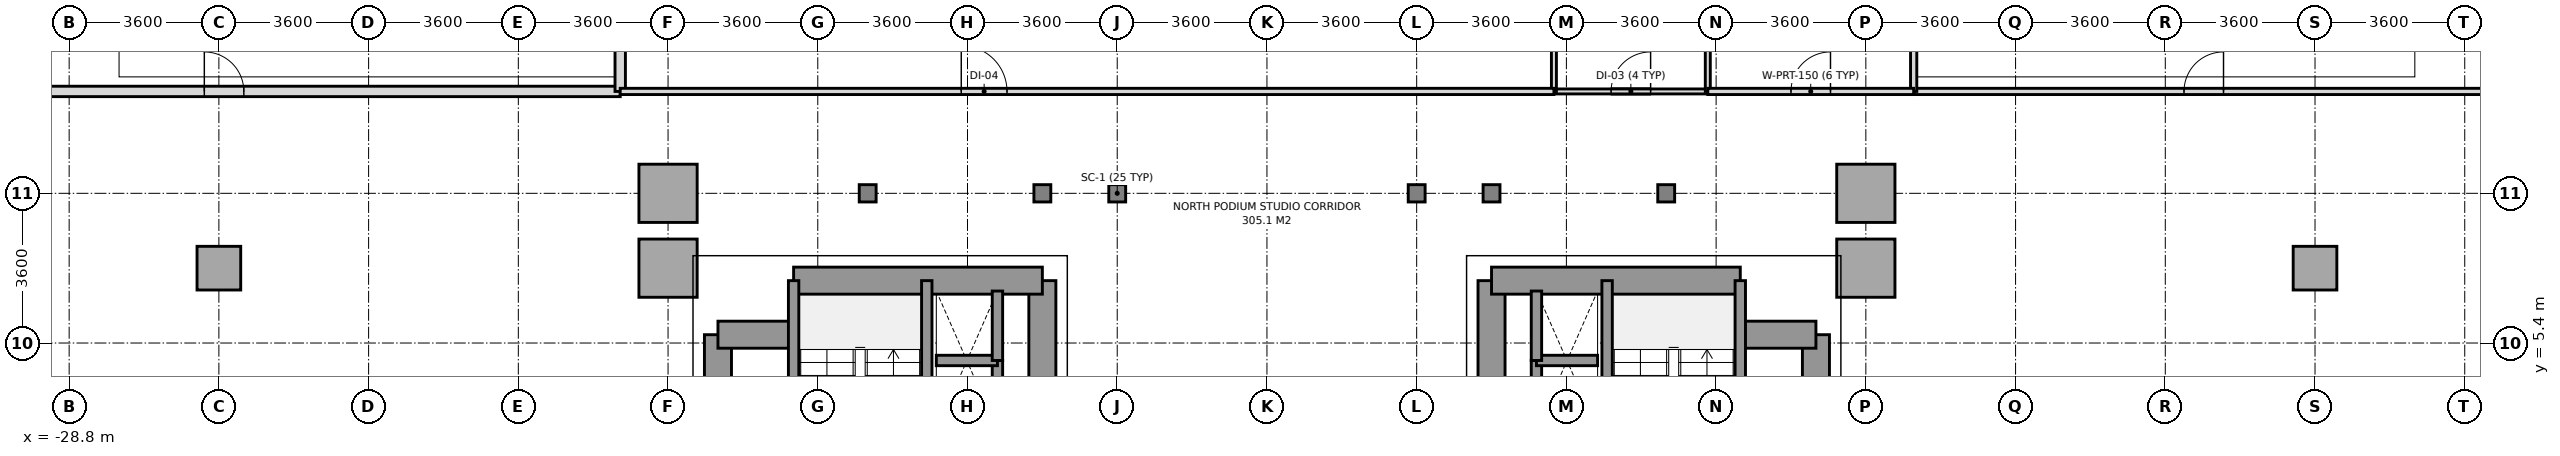
"""IFC4 building model, lengths in metres.
Left out: names, types, materials, properties, quantities, classifications, styles, units other than length and angle.
Written with IfcOpenShell. Run it as: python <this file> out.ifc"""

import sys

from ifc_helpers import new_model, si_unit, direction, frame, frame_2d, origin, origin_2d, place, context, subcontext, project, spatial, rectangle, i_section, extrude, source, transform, mapped, element, fill, save


model = new_model("IFC4")
c1 = context("Model", 3, precision=1e-05, world=origin(), true_north=direction((0.0, 1.0)))
c2 = subcontext(c1, "Body", "Model", "MODEL_VIEW")
j1 = project(units=[si_unit("LENGTHUNIT", "METRE"), si_unit("PLANEANGLEUNIT", "RADIAN")], contexts=[c1])
p1 = place(None, origin())
s1 = spatial("IfcSite", under=j1, at=p1, CompositionType="ELEMENT")
p2 = place(p1, origin())
s2 = spatial("IfcBuilding", under=s1, at=p2, CompositionType="ELEMENT")
p3 = place(p2, frame((0.0, 0.0, 5.4)))
s3 = spatial("IfcBuildingStorey", under=s2, at=p3, CompositionType="ELEMENT", Elevation=5.4)
m1 = source(origin(), c2, "Body", "SweptSolid", [
    extrude(rectangle(XDim=1.05, YDim=1.05, at=origin_2d()), origin(), (0.0, 0.0, 1.0), 4.52),
])
p4 = place(p3, frame((-25.2, 7.2, 0.0), z_axis=(0.0, 0.0, 1.0), x_axis=(1.0, 0.0, 0.0)))
e1 = element("IfcColumn", 1, at=p4, inside=s3, PredefinedType="COLUMN", context=c2, shape_type="MappedRepresentation", body=[
    mapped(m1, transform((0.0, 0.0, 0.0), x_axis=(1.0, 0.0, 0.0), y_axis=(0.0, 1.0, 0.0), z_axis=(0.0, 0.0, 1.0), scale=1.0)),
])
m2 = source(origin(), c2, "Body", "SweptSolid", [
    extrude(rectangle(XDim=1.4, YDim=1.4, at=origin_2d()), origin(), (0.0, 0.0, 1.0), 4.52),
])
for number, where, z_axis, x_axis in (
    (2, (-14.4, 7.2, 0.0), (0.0, 0.0, 1.0), (1.0, 0.0, 0.0)),
    (3, (-14.4, 9.0, 0.0), (0.0, 0.0, 1.0), (1.0, 0.0, 0.0)),
):
    element("IfcColumn", number, at=place(p3, frame(where, z_axis=z_axis, x_axis=x_axis)), inside=s3, PredefinedType="COLUMN", context=c2, shape_type="MappedRepresentation", body=[
        mapped(m2, transform((0.0, 0.0, 0.0), x_axis=(1.0, 0.0, 0.0), y_axis=(0.0, 1.0, 0.0), z_axis=(0.0, 0.0, 1.0), scale=1.0)),
    ])
m3 = source(origin(), c2, "Body", "SweptSolid", [
    extrude(i_section(OverallWidth=0.406, OverallDepth=0.416, WebThickness=0.024, FlangeThickness=0.039, at=origin_2d()), origin(), (0.0, 0.0, 1.0), 4.52),
])
for number, where, z_axis, x_axis in (
    (4, (-9.6, 9.0, 0.0), (0.0, 0.0, 1.0), (1.0, 0.0, 0.0)),
    (5, (-5.4, 9.0, 0.0), (0.0, 0.0, 1.0), (1.0, 0.0, 0.0)),
    (6, (-3.6, 9.0, 0.0), (0.0, 0.0, 1.0), (1.0, 0.0, 0.0)),
    (7, (3.6, 9.0, 0.0), (0.0, 0.0, 1.0), (1.0, 0.0, 0.0)),
    (8, (5.4, 9.0, 0.0), (0.0, 0.0, 1.0), (1.0, 0.0, 0.0)),
    (9, (9.6, 9.0, 0.0), (0.0, 0.0, 1.0), (1.0, 0.0, 0.0)),
):
    element("IfcColumn", number, at=place(p3, frame(where, z_axis=z_axis, x_axis=x_axis)), inside=s3, PredefinedType="COLUMN", context=c2, shape_type="MappedRepresentation", body=[
        mapped(m3, transform((0.0, 0.0, 0.0), x_axis=(1.0, 0.0, 0.0), y_axis=(0.0, 1.0, 0.0), z_axis=(0.0, 0.0, 1.0), scale=1.0)),
    ])
for number, where, z_axis, x_axis in (
    (10, (14.4, 7.2, 0.0), (0.0, 0.0, 1.0), (1.0, 0.0, 0.0)),
    (11, (14.4, 9.0, 0.0), (0.0, 0.0, 1.0), (1.0, 0.0, 0.0)),
):
    element("IfcColumn", number, at=place(p3, frame(where, z_axis=z_axis, x_axis=x_axis)), inside=s3, PredefinedType="COLUMN", context=c2, shape_type="MappedRepresentation", body=[
        mapped(m2, transform((0.0, 0.0, 0.0), x_axis=(1.0, 0.0, 0.0), y_axis=(0.0, 1.0, 0.0), z_axis=(0.0, 0.0, 1.0), scale=1.0)),
    ])
p5 = place(p3, frame((25.2, 7.2, 0.0), z_axis=(0.0, 0.0, 1.0), x_axis=(1.0, 0.0, 0.0)))
e12 = element("IfcColumn", 12, at=p5, inside=s3, PredefinedType="COLUMN", context=c2, shape_type="MappedRepresentation", body=[
    mapped(m1, transform((0.0, 0.0, 0.0), x_axis=(1.0, 0.0, 0.0), y_axis=(0.0, 1.0, 0.0), z_axis=(0.0, 0.0, 1.0), scale=1.0)),
])
p6 = place(p3, frame((-13.2, -5.6, 0.0), z_axis=(0.0, 0.0, 1.0), x_axis=(0.0, 1.0, 0.0)))
e13 = element("IfcWall", 13, at=p6, inside=s3, PredefinedType="SHEAR", context=c2, shape_type="SweptSolid", body=[
    extrude(rectangle(XDim=11.2, YDim=0.65, at=frame_2d((5.6, 0.0))), origin(), (0.0, 0.0, 1.0), 4.52),
])
p7 = place(p3, frame((-5.4, -5.6, 0.0), z_axis=(0.0, 0.0, 1.0), x_axis=(0.0, 1.0, 0.0)))
e14 = element("IfcWall", 14, at=p7, inside=s3, PredefinedType="SHEAR", context=c2, shape_type="SweptSolid", body=[
    extrude(rectangle(XDim=12.5, YDim=0.65, at=frame_2d((6.25, 0.0))), origin(), (0.0, 0.0, 1.0), 4.52),
])
p8 = place(p7, frame((4.55, 0.0, 0.0)))
e15 = element("IfcOpeningElement", 15, at=p8, cuts=e14, PredefinedType="OPENING", context=c2, shape_type="SweptSolid", body=[
    extrude(rectangle(XDim=1.2, YDim=2.2, at=frame_2d((0.6, 1.1))), frame((0.0, 0.335, 0.0), z_axis=(0.0, -1.0, 0.0), x_axis=(1.0, 0.0, 0.0)), (0.0, 0.0, 1.0), 0.67),
])
p9 = place(p3, frame((-11.381, 6.9, 0.0), z_axis=(0.0, 0.0, 1.0), x_axis=(1.0, 0.0, 0.0)))
e16 = element("IfcWall", 16, at=p9, inside=s3, PredefinedType="SHEAR", context=c2, shape_type="SweptSolid", body=[
    extrude(rectangle(XDim=5.981, YDim=0.65, at=frame_2d((2.991, 0.0))), origin(), (0.0, 0.0, 1.0), 4.52),
])
p10 = place(p3, frame((-13.2, 5.6, 0.0), z_axis=(0.0, 0.0, 1.0), x_axis=(1.0, 0.0, 0.0)))
e17 = element("IfcWall", 17, at=p10, inside=s3, PredefinedType="SHEAR", context=c2, shape_type="SweptSolid", body=[
    extrude(rectangle(XDim=1.819, YDim=0.65, at=frame_2d((0.909, 0.0))), origin(), (0.0, 0.0, 1.0), 4.52),
])
p11 = place(p3, frame((-8.179, -0.041, 0.0), z_axis=(0.0, 0.0, 1.0), x_axis=(0.0, 1.0, 0.0)))
e18 = element("IfcWall", 18, at=p11, inside=s3, PredefinedType="SOLIDWALL", context=c2, shape_type="SweptSolid", body=[
    extrude(rectangle(XDim=6.941, YDim=0.25, at=frame_2d((3.47, 0.0))), origin(), (0.0, 0.0, 1.0), 4.52),
])
p12 = place(p11, frame((0.2, 0.0, 0.0)))
e19 = element("IfcOpeningElement", 19, at=p12, cuts=e18, PredefinedType="OPENING", context=c2, shape_type="SweptSolid", body=[
    extrude(rectangle(XDim=1.2, YDim=2.2, at=frame_2d((0.6, 1.1))), frame((0.0, 0.135, 0.0), z_axis=(0.0, -1.0, 0.0), x_axis=(1.0, 0.0, 0.0)), (0.0, 0.0, 1.0), 0.27),
])
p13 = place(p3, frame((-11.381, -0.041, 0.0), z_axis=(0.0, 0.0, 1.0), x_axis=(0.0, 1.0, 0.0)))
e20 = element("IfcWall", 20, at=p13, inside=s3, PredefinedType="SOLIDWALL", context=c2, shape_type="SweptSolid", body=[
    extrude(rectangle(XDim=6.941, YDim=0.25, at=frame_2d((3.47, 0.0))), origin(), (0.0, 0.0, 1.0), 4.52),
])
p14 = place(p3, frame((13.2, -5.6, 0.0), z_axis=(0.0, 0.0, 1.0), x_axis=(0.0, 1.0, 0.0)))
e21 = element("IfcWall", 21, at=p14, inside=s3, PredefinedType="SHEAR", context=c2, shape_type="SweptSolid", body=[
    extrude(rectangle(XDim=11.2, YDim=0.65, at=frame_2d((5.6, 0.0))), origin(), (0.0, 0.0, 1.0), 4.52),
])
p15 = place(p3, frame((5.4, -5.6, 0.0), z_axis=(0.0, 0.0, 1.0), x_axis=(0.0, 1.0, 0.0)))
e22 = element("IfcWall", 22, at=p15, inside=s3, PredefinedType="SHEAR", context=c2, shape_type="SweptSolid", body=[
    extrude(rectangle(XDim=12.5, YDim=0.65, at=frame_2d((6.25, 0.0))), origin(), (0.0, 0.0, 1.0), 4.52),
])
p16 = place(p15, frame((4.55, 0.0, 0.0)))
e23 = element("IfcOpeningElement", 23, at=p16, cuts=e22, PredefinedType="OPENING", context=c2, shape_type="SweptSolid", body=[
    extrude(rectangle(XDim=1.2, YDim=2.2, at=frame_2d((0.6, 1.1))), frame((0.0, 0.335, 0.0), z_axis=(0.0, -1.0, 0.0), x_axis=(1.0, 0.0, 0.0)), (0.0, 0.0, 1.0), 0.67),
])
p17 = place(p15, frame((7.88, 0.0, 0.0)))
e24 = element("IfcOpeningElement", 24, at=p17, cuts=e22, PredefinedType="OPENING", context=c2, shape_type="SweptSolid", body=[
    extrude(rectangle(XDim=0.8, YDim=2.1, at=frame_2d((0.4, 1.05))), frame((0.0, 0.335, 0.0), z_axis=(0.0, -1.0, 0.0), x_axis=(1.0, 0.0, 0.0)), (0.0, 0.0, 1.0), 0.67),
])
p18 = place(p3, frame((5.4, 6.9, 0.0), z_axis=(0.0, 0.0, 1.0), x_axis=(1.0, 0.0, 0.0)))
e25 = element("IfcWall", 25, at=p18, inside=s3, PredefinedType="SHEAR", context=c2, shape_type="SweptSolid", body=[
    extrude(rectangle(XDim=5.981, YDim=0.65, at=frame_2d((2.991, 0.0))), origin(), (0.0, 0.0, 1.0), 4.52),
])
p19 = place(p3, frame((11.381, 5.6, 0.0), z_axis=(0.0, 0.0, 1.0), x_axis=(1.0, 0.0, 0.0)))
e26 = element("IfcWall", 26, at=p19, inside=s3, PredefinedType="SHEAR", context=c2, shape_type="SweptSolid", body=[
    extrude(rectangle(XDim=1.819, YDim=0.65, at=frame_2d((0.909, 0.0))), origin(), (0.0, 0.0, 1.0), 4.52),
])
p20 = place(p3, frame((8.179, -0.041, 0.0), z_axis=(0.0, 0.0, 1.0), x_axis=(0.0, 1.0, 0.0)))
e27 = element("IfcWall", 27, at=p20, inside=s3, PredefinedType="SOLIDWALL", context=c2, shape_type="SweptSolid", body=[
    extrude(rectangle(XDim=6.941, YDim=0.25, at=frame_2d((3.47, 0.0))), origin(), (0.0, 0.0, 1.0), 4.52),
])
p21 = place(p20, frame((0.2, 0.0, 0.0)))
e28 = element("IfcOpeningElement", 28, at=p21, cuts=e27, PredefinedType="OPENING", context=c2, shape_type="SweptSolid", body=[
    extrude(rectangle(XDim=1.2, YDim=2.2, at=frame_2d((0.6, 1.1))), frame((0.0, 0.135, 0.0), z_axis=(0.0, -1.0, 0.0), x_axis=(1.0, 0.0, 0.0)), (0.0, 0.0, 1.0), 0.27),
])
p22 = place(p3, frame((11.381, -0.041, 0.0), z_axis=(0.0, 0.0, 1.0), x_axis=(0.0, 1.0, 0.0)))
e29 = element("IfcWall", 29, at=p22, inside=s3, PredefinedType="SOLIDWALL", context=c2, shape_type="SweptSolid", body=[
    extrude(rectangle(XDim=6.941, YDim=0.25, at=frame_2d((3.47, 0.0))), origin(), (0.0, 0.0, 1.0), 4.52),
])
p23 = place(p3, frame((-6.48, 3.3, 0.0), z_axis=(0.0, 0.0, 1.0), x_axis=(0.0, 1.0, 0.0)))
e30 = element("IfcWall", 30, at=p23, inside=s3, PredefinedType="SOLIDWALL", context=c2, shape_type="SweptSolid", body=[
    extrude(rectangle(XDim=1.68, YDim=0.25, at=frame_2d((0.84, 0.0))), origin(), (0.0, 0.0, 1.0), 4.52),
])
p24 = place(p3, frame((-7.95, 4.98, 0.0), z_axis=(0.0, 0.0, 1.0), x_axis=(1.0, 0.0, 0.0)))
e31 = element("IfcWall", 31, at=p24, inside=s3, PredefinedType="SOLIDWALL", context=c2, shape_type="SweptSolid", body=[
    extrude(rectangle(XDim=1.47, YDim=0.25, at=frame_2d((0.735, 0.0))), origin(), (0.0, 0.0, 1.0), 4.52),
])
p25 = place(p3, frame((-6.48, 4.98, 0.0), z_axis=(0.0, 0.0, 1.0), x_axis=(0.0, 1.0, 0.0)))
e32 = element("IfcWall", 32, at=p25, inside=s3, PredefinedType="SOLIDWALL", context=c2, shape_type="SweptSolid", body=[
    extrude(rectangle(XDim=1.67, YDim=0.25, at=frame_2d((0.835, 0.0))), origin(), (0.0, 0.0, 1.0), 4.52),
])
p26 = place(p3, frame((6.48, 3.3, 0.0), z_axis=(0.0, 0.0, 1.0), x_axis=(0.0, 1.0, 0.0)))
e33 = element("IfcWall", 33, at=p26, inside=s3, PredefinedType="SOLIDWALL", context=c2, shape_type="SweptSolid", body=[
    extrude(rectangle(XDim=1.68, YDim=0.25, at=frame_2d((0.84, 0.0))), origin(), (0.0, 0.0, 1.0), 4.52),
])
p27 = place(p3, frame((6.48, 4.98, 0.0), z_axis=(0.0, 0.0, 1.0), x_axis=(1.0, 0.0, 0.0)))
e34 = element("IfcWall", 34, at=p27, inside=s3, PredefinedType="SOLIDWALL", context=c2, shape_type="SweptSolid", body=[
    extrude(rectangle(XDim=1.47, YDim=0.25, at=frame_2d((0.735, 0.0))), origin(), (0.0, 0.0, 1.0), 4.52),
])
p28 = place(p3, frame((6.48, 4.98, 0.0), z_axis=(0.0, 0.0, 1.0), x_axis=(0.0, 1.0, 0.0)))
e35 = element("IfcWall", 35, at=p28, inside=s3, PredefinedType="SOLIDWALL", context=c2, shape_type="SweptSolid", body=[
    extrude(rectangle(XDim=1.67, YDim=0.25, at=frame_2d((0.835, 0.0))), origin(), (0.0, 0.0, 1.0), 4.52),
])
p29 = place(p3, frame((6.9, 11.45, 0.0), z_axis=(0.0, 0.0, 1.0), x_axis=(1.0, 0.0, 0.0)))
e36 = element("IfcWall", 36, at=p29, inside=s3, PredefinedType="PARTITIONING", context=c2, shape_type="SweptSolid", body=[
    extrude(rectangle(XDim=3.7, YDim=0.12, at=frame_2d((1.85, 0.0))), origin(), (0.0, 0.0, 1.0), 4.52),
])
p30 = place(p29, frame((1.375, 0.0, 0.0)))
e37 = element("IfcOpeningElement", 37, at=p30, cuts=e36, PredefinedType="OPENING", context=c2, shape_type="SweptSolid", body=[
    extrude(rectangle(XDim=0.95, YDim=2.15, at=frame_2d((0.475, 1.075))), frame((0.0, 0.07, 0.0), z_axis=(0.0, -1.0, 0.0), x_axis=(1.0, 0.0, 0.0)), (0.0, 0.0, 1.0), 0.14),
])
p31 = place(p3, frame((6.9, 11.45, 0.0), z_axis=(0.0, 0.0, 1.0), x_axis=(0.0, 1.0, 0.0)))
e38 = element("IfcWall", 38, at=p31, inside=s3, PredefinedType="PARTITIONING", context=c2, shape_type="SweptSolid", body=[
    extrude(rectangle(XDim=3.73, YDim=0.12, at=frame_2d((1.865, 0.0))), origin(), (0.0, 0.0, 1.0), 3.82),
])
p32 = place(p3, frame((10.6, 11.45, 0.0), z_axis=(0.0, 0.0, 1.0), x_axis=(0.0, 1.0, 0.0)))
e39 = element("IfcWall", 39, at=p32, inside=s3, PredefinedType="PARTITIONING", context=c2, shape_type="SweptSolid", body=[
    extrude(rectangle(XDim=3.73, YDim=0.12, at=frame_2d((1.865, 0.0))), origin(), (0.0, 0.0, 1.0), 4.52),
])
p33 = place(p3, frame((-32.05, 11.45, 0.0), z_axis=(0.0, 0.0, 1.0), x_axis=(1.0, 0.0, 0.0)))
e40 = element("IfcWall", 40, at=p33, inside=s3, PredefinedType="SOLIDWALL", context=c2, shape_type="SweptSolid", body=[
    extrude(rectangle(XDim=16.5, YDim=0.25, at=frame_2d((8.25, 0.0))), origin(), (0.0, 0.0, 1.0), 4.52),
])
p34 = place(p33, frame((6.5, 0.0, 0.0)))
e41 = element("IfcOpeningElement", 41, at=p34, cuts=e40, PredefinedType="OPENING", context=c2, shape_type="SweptSolid", body=[
    extrude(rectangle(XDim=0.95, YDim=2.15, at=frame_2d((0.475, 1.075))), frame((0.0, 0.135, 0.0), z_axis=(0.0, -1.0, 0.0), x_axis=(1.0, 0.0, 0.0)), (0.0, 0.0, 1.0), 0.27),
])
p35 = place(p3, frame((-15.55, 11.45, 0.0), z_axis=(0.0, 0.0, 1.0), x_axis=(0.0, 1.0, 0.0)))
e42 = element("IfcWall", 42, at=p35, inside=s3, PredefinedType="SOLIDWALL", context=c2, shape_type="SweptSolid", body=[
    extrude(rectangle(XDim=11.6, YDim=0.25, at=frame_2d((5.8, 0.0))), origin(), (0.0, 0.0, 1.0), 4.52),
])
p36 = place(p3, frame((15.55, 11.45, 0.0), z_axis=(0.0, 0.0, 1.0), x_axis=(1.0, 0.0, 0.0)))
e43 = element("IfcWall", 43, at=p36, inside=s3, PredefinedType="PARTITIONING", context=c2, shape_type="SweptSolid", body=[
    extrude(rectangle(XDim=16.5, YDim=0.15, at=frame_2d((8.25, 0.0))), origin(), (0.0, 0.0, 1.0), 4.52),
])
p37 = place(p36, frame((6.5, 0.0, 0.0)))
e44 = element("IfcOpeningElement", 44, at=p37, cuts=e43, PredefinedType="OPENING", context=c2, shape_type="SweptSolid", body=[
    extrude(rectangle(XDim=0.95, YDim=2.15, at=frame_2d((0.475, 1.075))), frame((0.0, 0.085, 0.0), z_axis=(0.0, -1.0, 0.0), x_axis=(1.0, 0.0, 0.0)), (0.0, 0.0, 1.0), 0.17),
])
p38 = place(p3, frame((15.55, 11.45, 0.0), z_axis=(0.0, 0.0, 1.0), x_axis=(0.0, 1.0, 0.0)))
e45 = element("IfcWall", 45, at=p38, inside=s3, PredefinedType="PARTITIONING", context=c2, shape_type="SweptSolid", body=[
    extrude(rectangle(XDim=11.6, YDim=0.15, at=frame_2d((5.8, 0.0))), origin(), (0.0, 0.0, 1.0), 4.52),
])
p39 = place(p3, frame((-15.55, 11.45, 0.0), z_axis=(0.0, 0.0, 1.0), x_axis=(1.0, 0.0, 0.0)))
e46 = element("IfcWall", 46, at=p39, inside=s3, PredefinedType="PARTITIONING", context=c2, shape_type="SweptSolid", body=[
    extrude(rectangle(XDim=22.45, YDim=0.15, at=frame_2d((11.225, 0.0))), origin(), (0.0, 0.0, 1.0), 3.92),
])
p40 = place(p39, frame((8.2, 0.0, 0.0)))
e47 = element("IfcOpeningElement", 47, at=p40, cuts=e46, PredefinedType="OPENING", context=c2, shape_type="SweptSolid", body=[
    extrude(rectangle(XDim=1.1, YDim=2.2, at=frame_2d((0.55, 1.1))), frame((0.0, 0.085, 0.0), z_axis=(0.0, -1.0, 0.0), x_axis=(1.0, 0.0, 0.0)), (0.0, 0.0, 1.0), 0.17),
])
p41 = place(p3, frame((10.6, 11.45, 0.0), z_axis=(0.0, 0.0, 1.0), x_axis=(1.0, 0.0, 0.0)))
e48 = element("IfcWall", 48, at=p41, inside=s3, PredefinedType="PARTITIONING", context=c2, shape_type="SweptSolid", body=[
    extrude(rectangle(XDim=4.95, YDim=0.15, at=frame_2d((2.475, 0.0))), origin(), (0.0, 0.0, 1.0), 3.92),
])
p42 = place(p41, frame((2.0, 0.0, 0.0)))
e49 = element("IfcOpeningElement", 49, at=p42, cuts=e48, PredefinedType="OPENING", context=c2, shape_type="SweptSolid", body=[
    extrude(rectangle(XDim=0.95, YDim=2.15, at=frame_2d((0.475, 1.075))), frame((0.0, 0.085, 0.0), z_axis=(0.0, -1.0, 0.0), x_axis=(1.0, 0.0, 0.0)), (0.0, 0.0, 1.0), 0.17),
])
m4 = source(origin(), c2, "Body", "SweptSolid", [
    extrude(rectangle(XDim=0.95, YDim=2.15, at=frame_2d((0.475, 1.075))), frame((0.0, 0.025, 0.0), z_axis=(0.0, -1.0, 0.0), x_axis=(1.0, 0.0, 0.0)), (0.0, 0.0, 1.0), 0.05),
])
p43 = place(p30, origin())
e50 = element("IfcDoor", 50, at=p43, inside=s3, OperationType="SINGLE_SWING_RIGHT", PredefinedType="DOOR", context=c2, shape_type="MappedRepresentation", body=[
    mapped(m4, transform((0.0, 0.0, 0.0), x_axis=(1.0, 0.0, 0.0), y_axis=(0.0, 1.0, 0.0), z_axis=(0.0, 0.0, 1.0), scale=1.0)),
])
fill(e37, e50)
p44 = place(p34, origin())
e51 = element("IfcDoor", 51, at=p44, inside=s3, OperationType="SINGLE_SWING_LEFT", PredefinedType="DOOR", context=c2, shape_type="MappedRepresentation", body=[
    mapped(m4, transform((0.0, 0.0, 0.0), x_axis=(1.0, 0.0, 0.0), y_axis=(0.0, 1.0, 0.0), z_axis=(0.0, 0.0, 1.0), scale=1.0)),
])
fill(e41, e51)
p45 = place(p37, origin())
e52 = element("IfcDoor", 52, at=p45, inside=s3, OperationType="SINGLE_SWING_RIGHT", PredefinedType="DOOR", context=c2, shape_type="MappedRepresentation", body=[
    mapped(m4, transform((0.0, 0.0, 0.0), x_axis=(1.0, 0.0, 0.0), y_axis=(0.0, 1.0, 0.0), z_axis=(0.0, 0.0, 1.0), scale=1.0)),
])
fill(e44, e52)
m5 = source(origin(), c2, "Body", "SweptSolid", [
    extrude(rectangle(XDim=1.1, YDim=2.2, at=frame_2d((0.55, 1.1))), frame((0.0, 0.025, 0.0), z_axis=(0.0, -1.0, 0.0), x_axis=(1.0, 0.0, 0.0)), (0.0, 0.0, 1.0), 0.05),
])
p46 = place(p40, origin())
e53 = element("IfcDoor", 53, at=p46, inside=s3, OperationType="SINGLE_SWING_LEFT", PredefinedType="DOOR", context=c2, shape_type="MappedRepresentation", body=[
    mapped(m5, transform((0.0, 0.0, 0.0), x_axis=(1.0, 0.0, 0.0), y_axis=(0.0, 1.0, 0.0), z_axis=(0.0, 0.0, 1.0), scale=1.0)),
])
fill(e47, e53)
p47 = place(p42, origin())
e54 = element("IfcDoor", 54, at=p47, inside=s3, OperationType="SINGLE_SWING_RIGHT", PredefinedType="DOOR", context=c2, shape_type="MappedRepresentation", body=[
    mapped(m4, transform((0.0, 0.0, 0.0), x_axis=(1.0, 0.0, 0.0), y_axis=(0.0, 1.0, 0.0), z_axis=(0.0, 0.0, 1.0), scale=1.0)),
])
fill(e49, e54)
save(model, sys.argv[1])
